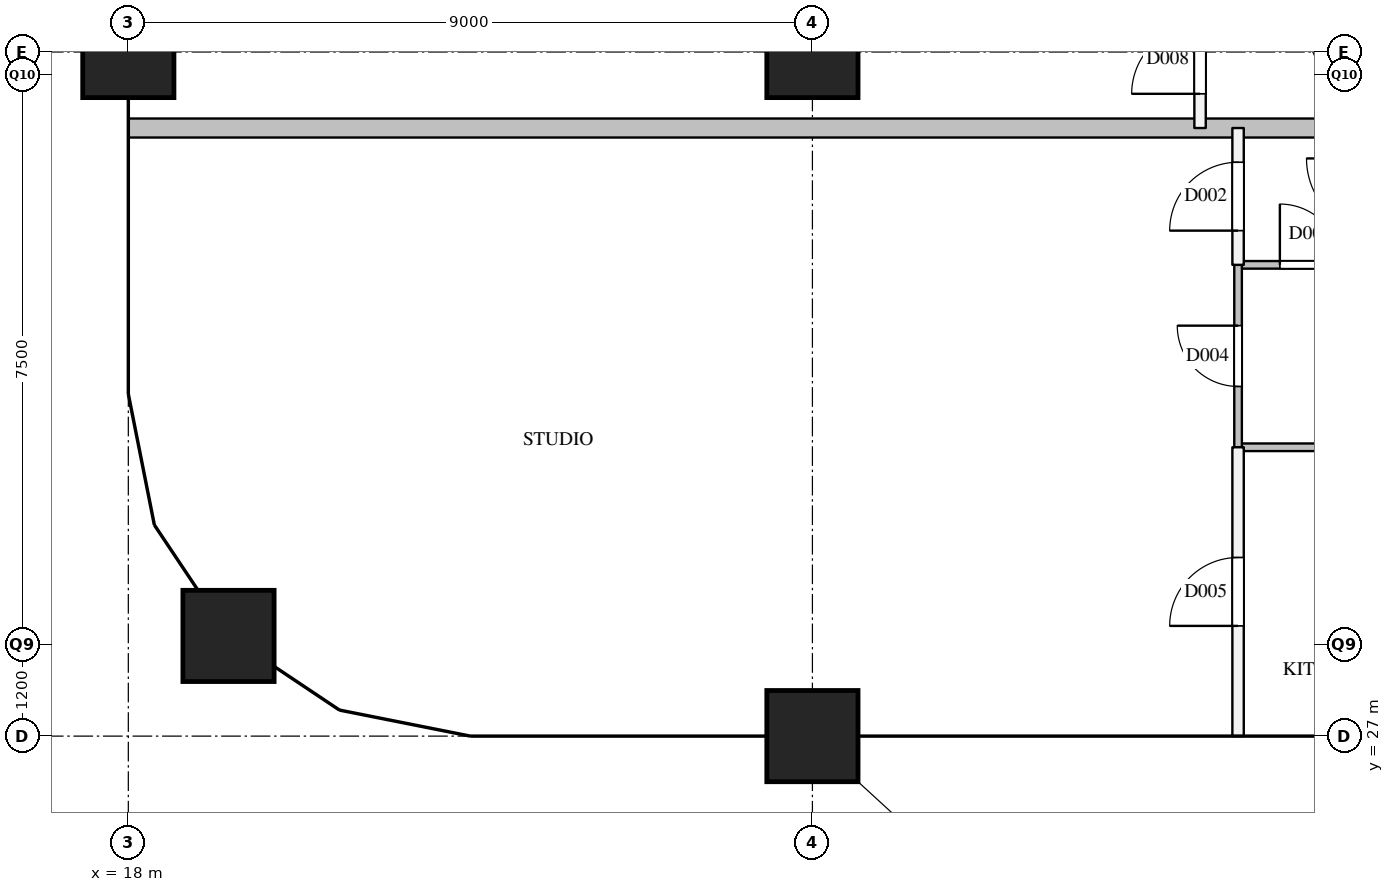
"""IFC4 building model, lengths in metres.
Left out: names, types, materials, properties, quantities, classifications, styles, units other than length and angle.
Written with IfcOpenShell. Run it as: python <this file> out.ifc"""

import sys

from ifc_helpers import new_model, si_unit, direction, frame, frame_2d, origin, origin_2d, place, context, subcontext, project, spatial, rectangle, extrude, element, fill, save


model = new_model("IFC4")
c1 = context("Model", 3, precision=1e-05, world=origin(), true_north=direction((0.0, 1.0)))
c2 = subcontext(c1, "Body", "Model", "MODEL_VIEW")
j1 = project(units=[si_unit("LENGTHUNIT", "METRE"), si_unit("PLANEANGLEUNIT", "RADIAN")], contexts=[c1])
p1 = place(None, origin())
s1 = spatial("IfcSite", under=j1, at=p1, CompositionType="ELEMENT")
p2 = place(p1, origin())
s2 = spatial("IfcBuilding", under=s1, at=p2, CompositionType="ELEMENT")
p3 = place(p2, frame((0.0, 0.0, 242.3)))
s3 = spatial("IfcBuildingStorey", under=s2, at=p3, CompositionType="ELEMENT", Elevation=242.3)
for number, where, z_axis, x_axis in (
    (1, (19.318, 28.318, 0.0), (0.0, 0.0, 1.0), (1.0, 0.0, 0.0)),
    (2, (18.0, 36.0, 0.0), (0.0, 0.0, 1.0), (1.0, 0.0, 0.0)),
    (3, (27.0, 27.0, 0.0), (0.0, 0.0, 1.0), (1.0, 0.0, 0.0)),
    (4, (27.0, 36.0, 0.0), (0.0, 0.0, 1.0), (1.0, 0.0, 0.0)),
):
    element("IfcColumn", number, at=place(p3, frame(where, z_axis=z_axis, x_axis=x_axis)), inside=s3, PredefinedType="COLUMN", context=c2, shape_type="SweptSolid", body=[
        extrude(rectangle(XDim=1.2, YDim=1.2, at=origin_2d()), origin(), (0.0, 0.0, 1.0), 3.9),
    ])
p4 = place(p3, frame((32.1, 35.0, 0.0), z_axis=(0.0, 0.0, 1.0), x_axis=(0.0, 1.0, 0.0)))
e5 = element("IfcWall", 5, at=p4, inside=s3, PredefinedType="PARTITIONING", context=c2, shape_type="SweptSolid", body=[
    extrude(rectangle(XDim=1.8, YDim=0.15, at=frame_2d((0.9, 0.0))), origin(), (0.0, 0.0, 1.0), 3.6),
])
p5 = place(p4, frame((0.45, 0.0, 0.0)))
e6 = element("IfcOpeningElement", 6, at=p5, cuts=e5, PredefinedType="OPENING", context=c2, shape_type="SweptSolid", body=[
    extrude(rectangle(XDim=0.9, YDim=2.1, at=frame_2d((0.45, 1.05))), frame((0.0, 0.085, 0.0), z_axis=(0.0, -1.0, 0.0), x_axis=(1.0, 0.0, 0.0)), (0.0, 0.0, 1.0), 0.17),
])
p6 = place(p3, frame((32.6, 27.0, 0.0), z_axis=(0.0, 0.0, 1.0), x_axis=(0.0, 1.0, 0.0)))
e7 = element("IfcWall", 7, at=p6, inside=s3, PredefinedType="PARTITIONING", context=c2, shape_type="SweptSolid", body=[
    extrude(rectangle(XDim=3.8, YDim=0.15, at=frame_2d((1.9, 0.0))), origin(), (0.0, 0.0, 1.0), 2.6),
])
p7 = place(p6, frame((1.45, 0.0, 0.0)))
e8 = element("IfcOpeningElement", 8, at=p7, cuts=e7, PredefinedType="OPENING", context=c2, shape_type="SweptSolid", body=[
    extrude(rectangle(XDim=0.9, YDim=2.1, at=frame_2d((0.45, 1.05))), frame((0.0, 0.085, 0.0), z_axis=(0.0, -1.0, 0.0), x_axis=(1.0, 0.0, 0.0)), (0.0, 0.0, 1.0), 0.17),
])
p8 = place(p3, frame((32.6, 33.2, 0.0), z_axis=(0.0, 0.0, 1.0), x_axis=(0.0, 1.0, 0.0)))
e9 = element("IfcWall", 9, at=p8, inside=s3, PredefinedType="PARTITIONING", context=c2, shape_type="SweptSolid", body=[
    extrude(rectangle(XDim=1.8, YDim=0.15, at=frame_2d((0.9, 0.0))), origin(), (0.0, 0.0, 1.0), 3.6),
])
p9 = place(p8, frame((0.45, 0.0, 0.0)))
e10 = element("IfcOpeningElement", 10, at=p9, cuts=e9, PredefinedType="OPENING", context=c2, shape_type="SweptSolid", body=[
    extrude(rectangle(XDim=0.9, YDim=2.1, at=frame_2d((0.45, 1.05))), frame((0.0, 0.085, 0.0), z_axis=(0.0, -1.0, 0.0), x_axis=(1.0, 0.0, 0.0)), (0.0, 0.0, 1.0), 0.17),
])
p10 = place(p3, frame((18.0, 35.0, 0.0), z_axis=(0.0, 0.0, 1.0), x_axis=(1.0, 0.0, 0.0)))
e11 = element("IfcWall", 11, at=p10, inside=s3, PredefinedType="PARTITIONING", context=c2, shape_type="SweptSolid", body=[
    extrude(rectangle(XDim=16.5, YDim=0.25, at=frame_2d((8.25, 0.0))), origin(), (0.0, 0.0, 1.0), 2.6),
])
p11 = place(p3, frame((32.6, 30.8, 0.0), z_axis=(0.0, 0.0, 1.0), x_axis=(1.0, 0.0, 0.0)))
e12 = element("IfcWall", 12, at=p11, inside=s3, PredefinedType="PARTITIONING", context=c2, shape_type="SweptSolid", body=[
    extrude(rectangle(XDim=1.9, YDim=0.1, at=frame_2d((0.95, 0.0))), origin(), (0.0, 0.0, 1.0), 3.6),
])
p12 = place(p3, frame((32.6, 33.2, 0.0), z_axis=(0.0, 0.0, 1.0), x_axis=(1.0, 0.0, 0.0)))
e13 = element("IfcWall", 13, at=p12, inside=s3, PredefinedType="PARTITIONING", context=c2, shape_type="SweptSolid", body=[
    extrude(rectangle(XDim=1.9, YDim=0.1, at=frame_2d((0.95, 0.0))), origin(), (0.0, 0.0, 1.0), 3.6),
])
p13 = place(p12, frame((0.55, 0.0, 0.0)))
e14 = element("IfcOpeningElement", 14, at=p13, cuts=e13, PredefinedType="OPENING", context=c2, shape_type="SweptSolid", body=[
    extrude(rectangle(XDim=0.8, YDim=2.1, at=frame_2d((0.4, 1.05))), frame((0.0, 0.06, 0.0), z_axis=(0.0, -1.0, 0.0), x_axis=(1.0, 0.0, 0.0)), (0.0, 0.0, 1.0), 0.12),
])
p14 = place(p3, frame((32.6, 30.8, 0.0), z_axis=(0.0, 0.0, 1.0), x_axis=(0.0, 1.0, 0.0)))
e15 = element("IfcWall", 15, at=p14, inside=s3, PredefinedType="PARTITIONING", context=c2, shape_type="SweptSolid", body=[
    extrude(rectangle(XDim=2.4, YDim=0.1, at=frame_2d((1.2, 0.0))), origin(), (0.0, 0.0, 1.0), 3.6),
])
p15 = place(p14, frame((0.8, 0.0, 0.0)))
e16 = element("IfcOpeningElement", 16, at=p15, cuts=e15, PredefinedType="OPENING", context=c2, shape_type="SweptSolid", body=[
    extrude(rectangle(XDim=0.8, YDim=2.1, at=frame_2d((0.4, 1.05))), frame((0.0, 0.06, 0.0), z_axis=(0.0, -1.0, 0.0), x_axis=(1.0, 0.0, 0.0)), (0.0, 0.0, 1.0), 0.12),
])
p16 = place(p9, origin())
e17 = element("IfcDoor", 17, at=p16, inside=s3, OperationType="SINGLE_SWING_LEFT", PredefinedType="DOOR", context=c2, shape_type="SweptSolid", body=[
    extrude(rectangle(XDim=0.9, YDim=2.1, at=frame_2d((0.45, 1.05))), frame((0.0, 0.025, 0.0), z_axis=(0.0, -1.0, 0.0), x_axis=(1.0, 0.0, 0.0)), (0.0, 0.0, 1.0), 0.05),
])
fill(e10, e17)
p17 = place(p13, origin())
e18 = element("IfcDoor", 18, at=p17, inside=s3, OperationType="SINGLE_SWING_LEFT", PredefinedType="DOOR", context=c2, shape_type="SweptSolid", body=[
    extrude(rectangle(XDim=0.8, YDim=2.1, at=frame_2d((0.4, 1.05))), frame((0.0, 0.025, 0.0), z_axis=(0.0, -1.0, 0.0), x_axis=(1.0, 0.0, 0.0)), (0.0, 0.0, 1.0), 0.05),
])
fill(e14, e18)
p18 = place(p15, origin())
e19 = element("IfcDoor", 19, at=p18, inside=s3, OperationType="SINGLE_SWING_RIGHT", PredefinedType="DOOR", context=c2, shape_type="SweptSolid", body=[
    extrude(rectangle(XDim=0.8, YDim=2.1, at=frame_2d((0.4, 1.05))), frame((0.0, 0.025, 0.0), z_axis=(0.0, -1.0, 0.0), x_axis=(1.0, 0.0, 0.0)), (0.0, 0.0, 1.0), 0.05),
])
fill(e16, e19)
p19 = place(p7, origin())
e20 = element("IfcDoor", 20, at=p19, inside=s3, OperationType="SINGLE_SWING_LEFT", PredefinedType="DOOR", context=c2, shape_type="SweptSolid", body=[
    extrude(rectangle(XDim=0.9, YDim=2.1, at=frame_2d((0.45, 1.05))), frame((0.0, 0.025, 0.0), z_axis=(0.0, -1.0, 0.0), x_axis=(1.0, 0.0, 0.0)), (0.0, 0.0, 1.0), 0.05),
])
fill(e8, e20)
p20 = place(p5, origin())
e21 = element("IfcDoor", 21, at=p20, inside=s3, OperationType="SINGLE_SWING_LEFT", PredefinedType="DOOR", context=c2, shape_type="SweptSolid", body=[
    extrude(rectangle(XDim=0.9, YDim=2.1, at=frame_2d((0.45, 1.05))), frame((0.0, 0.025, 0.0), z_axis=(0.0, -1.0, 0.0), x_axis=(1.0, 0.0, 0.0)), (0.0, 0.0, 1.0), 0.05),
])
fill(e6, e21)
save(model, sys.argv[1])
